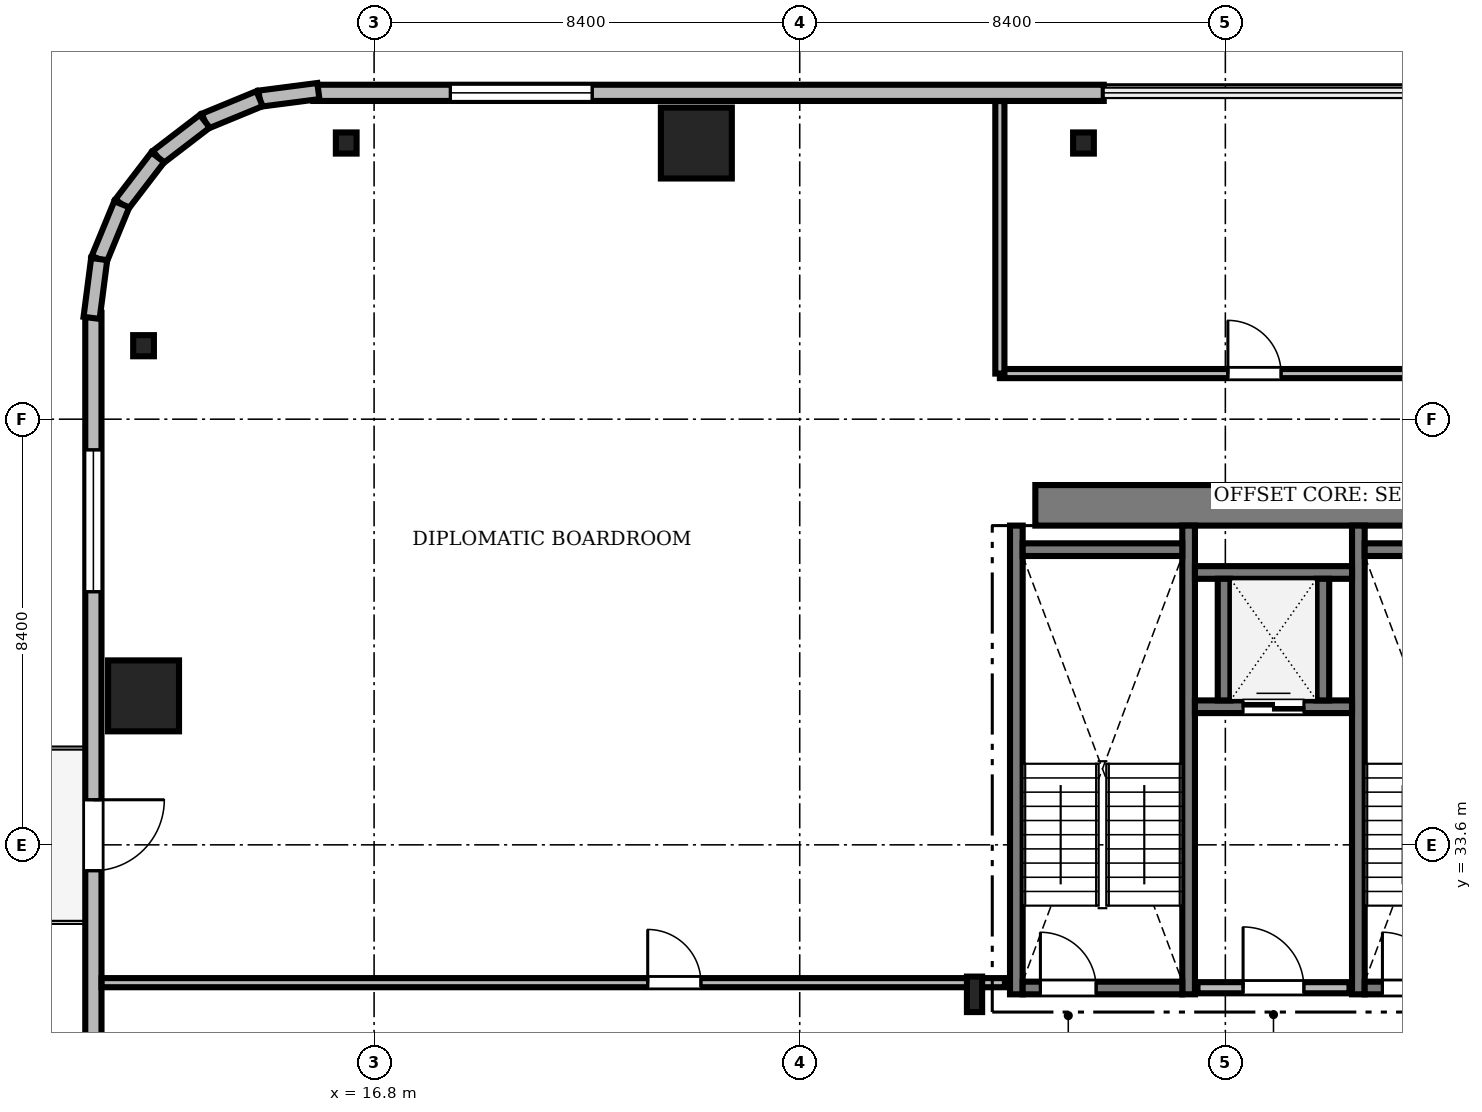
"""IFC4 building model, lengths in metres.
Left out: names, types, materials, properties, quantities, classifications, styles, units other than length and angle.
Written with IfcOpenShell. Run it as: python <this file> out.ifc"""

import sys

from ifc_helpers import new_model, si_unit, direction, frame, frame_2d, origin, origin_2d, place, context, subcontext, project, spatial, rectangle, i_section, extrude, source, transform, mapped, element, fill, save


model = new_model("IFC4")
c1 = context("Model", 3, precision=1e-05, world=origin(), true_north=direction((0.0, 1.0)))
c2 = subcontext(c1, "Body", "Model", "MODEL_VIEW")
j1 = project(units=[si_unit("LENGTHUNIT", "METRE"), si_unit("PLANEANGLEUNIT", "RADIAN")], contexts=[c1])
p1 = place(None, origin())
s1 = spatial("IfcSite", under=j1, at=p1, CompositionType="ELEMENT")
p2 = place(p1, origin())
s2 = spatial("IfcBuilding", under=s1, at=p2, CompositionType="ELEMENT")
p3 = place(p2, frame((0.0, 0.0, 233.55)))
s3 = spatial("IfcBuildingStorey", under=s2, at=p3, CompositionType="ELEMENT", Elevation=233.55)
m1 = source(origin(), c2, "Body", "SweptSolid", [
    extrude(rectangle(XDim=17.52, YDim=0.8, at=frame_2d((8.76, 0.0))), origin(), (0.0, 0.0, 1.0), 3.1),
])
p4 = place(p3, frame((29.85, 40.3, 0.0), z_axis=(0.0, 0.0, 1.0), x_axis=(1.0, 0.0, 0.0)))
e1 = element("IfcWall", 1, at=p4, inside=s3, PredefinedType="SHEAR", context=c2, shape_type="MappedRepresentation", body=[
    mapped(m1, transform((0.0, 0.0, 0.0), scale=1.0)),
])
m2 = source(origin(), c2, "Body", "SweptSolid", [
    extrude(i_section(OverallWidth=0.3, OverallDepth=0.7, WebThickness=0.017, FlangeThickness=0.032, FilletRadius=0.027, at=origin_2d()), origin(), (0.0, 0.0, 1.0), 3.1),
])
p5 = place(p3, frame((28.65, 30.65, 0.0), z_axis=(0.0, 0.0, 1.0), x_axis=(1.0, 0.0, 0.0)))
e2 = element("IfcColumn", 2, at=p5, inside=s3, PredefinedType="COLUMN", context=c2, shape_type="MappedRepresentation", body=[
    mapped(m2, transform((0.0, 0.0, 0.0), scale=1.0)),
])
m3 = source(origin(), c2, "Body", "SweptSolid", [
    extrude(rectangle(XDim=1.4, YDim=1.4, at=origin_2d()), origin(), (0.0, 0.0, 1.0), 3.1),
])
for number, where, z_axis, x_axis in (
    (3, (23.16, 47.45, 0.0), (0.0, 0.0, 1.0), (1.0, 0.0, 0.0)),
    (4, (12.25, 36.54, 0.0), (0.0, 0.0, 1.0), (1.0, 0.0, 0.0)),
):
    element("IfcColumn", number, at=place(p3, frame(where, z_axis=z_axis, x_axis=x_axis)), inside=s3, PredefinedType="COLUMN", context=c2, shape_type="MappedRepresentation", body=[
        mapped(m3, transform((0.0, 0.0, 0.0), scale=1.0)),
    ])
m4 = source(origin(), c2, "Body", "SweptSolid", [
    extrude(i_section(OverallWidth=0.409, OverallDepth=0.417, WebThickness=0.021, FlangeThickness=0.033, FilletRadius=0.015, at=origin_2d()), origin(), (0.0, 0.0, 1.0), 3.1),
])
for number, where, z_axis, x_axis in (
    (5, (30.8, 47.45, 0.0), (0.0, 0.0, 1.0), (1.0, 0.0, 0.0)),
    (6, (16.25, 47.45, 0.0), (0.0, 0.0, 1.0), (1.0, 0.0, 0.0)),
    (7, (12.25, 43.45, 0.0), (0.0, 0.0, 1.0), (1.0, 0.0, 0.0)),
):
    element("IfcColumn", number, at=place(p3, frame(where, z_axis=z_axis, x_axis=x_axis)), inside=s3, PredefinedType="COLUMN", context=c2, shape_type="MappedRepresentation", body=[
        mapped(m4, transform((0.0, 0.0, 0.0), scale=1.0)),
    ])
m5 = source(origin(), c2, "Body", "SweptSolid", [
    extrude(rectangle(XDim=15.6, YDim=0.32, at=frame_2d((7.8, 0.0))), origin(), (0.0, 0.0, 1.0), 3.1),
])
p6 = place(p3, frame((31.2, 48.44, 0.0), z_axis=(0.0, 0.0, 1.0), x_axis=(-1.0, 0.0, 0.0)))
e8 = element("IfcWall", 8, at=p6, inside=s3, PredefinedType="SOLIDWALL", context=c2, shape_type="MappedRepresentation", body=[
    mapped(m5, transform((0.0, 0.0, 0.0), scale=1.0)),
])
m6 = source(origin(), c2, "Body", "SweptSolid", [
    extrude(rectangle(XDim=2.8, YDim=2.4, at=frame_2d((1.4, 1.2))), frame((0.0, 0.17, 0.0), z_axis=(0.0, -1.0, 0.0), x_axis=(1.0, 0.0, 0.0)), (0.0, 0.0, 1.0), 0.34),
])
p7 = place(p6, frame((10.095, 0.0, 0.44)))
e9 = element("IfcOpeningElement", 9, at=p7, cuts=e8, PredefinedType="OPENING", context=c2, shape_type="MappedRepresentation", body=[
    mapped(m6, transform((0.0, 0.0, 0.0), scale=1.0)),
])
m7 = source(origin(), c2, "Body", "SweptSolid", [
    extrude(rectangle(XDim=15.6, YDim=0.32, at=frame_2d((7.8, 0.0))), origin(), (0.0, 0.0, 1.0), 3.1),
])
p8 = place(p3, frame((11.26, 44.1, 0.0), z_axis=(0.0, 0.0, 1.0), x_axis=(0.0, -1.0, 0.0)))
e10 = element("IfcWall", 10, at=p8, inside=s3, PredefinedType="SOLIDWALL", context=c2, shape_type="MappedRepresentation", body=[
    mapped(m7, transform((0.0, 0.0, 0.0), scale=1.0)),
])
m8 = source(origin(), c2, "Body", "SweptSolid", [
    extrude(rectangle(XDim=1.4, YDim=2.3, at=frame_2d((0.7, 1.15))), frame((0.0, 0.17, 0.0), z_axis=(0.0, -1.0, 0.0), x_axis=(1.0, 0.0, 0.0)), (0.0, 0.0, 1.0), 0.34),
])
p9 = place(p8, frame((9.61, 0.0, 0.0)))
e11 = element("IfcOpeningElement", 11, at=p9, cuts=e10, PredefinedType="OPENING", context=c2, shape_type="MappedRepresentation", body=[
    mapped(m8, transform((0.0, 0.0, 0.0), scale=1.0)),
])
p10 = place(p8, frame((2.705, 0.0, 0.44)))
e12 = element("IfcOpeningElement", 12, at=p10, cuts=e10, PredefinedType="OPENING", context=c2, shape_type="MappedRepresentation", body=[
    mapped(m6, transform((0.0, 0.0, 0.0), scale=1.0)),
])
m9 = source(origin(), c2, "Body", "SweptSolid", [
    extrude(rectangle(XDim=1.17, YDim=0.32, at=frame_2d((0.585, 0.0))), origin(), (0.0, 0.0, 1.0), 3.1),
])
p11 = place(p3, frame((15.7, 48.476, 0.0), z_axis=(0.0, 0.0, 1.0), x_axis=(-0.991735963317, -0.128295670475, 0.0)))
e13 = element("IfcWall", 13, at=p11, inside=s3, PredefinedType="SOLIDWALL", context=c2, shape_type="MappedRepresentation", body=[
    mapped(m9, transform((0.0, 0.0, 0.0), scale=1.0)),
])
m10 = source(origin(), c2, "Body", "SweptSolid", [
    extrude(rectangle(XDim=1.169, YDim=0.32, at=frame_2d((0.584, 0.0))), origin(), (0.0, 0.0, 1.0), 3.1),
])
p12 = place(p3, frame((14.54, 48.325, 0.0), z_axis=(0.0, 0.0, 1.0), x_axis=(-0.924552646638, -0.381054331552, 0.0)))
e14 = element("IfcWall", 14, at=p12, inside=s3, PredefinedType="SOLIDWALL", context=c2, shape_type="MappedRepresentation", body=[
    mapped(m10, transform((0.0, 0.0, 0.0), scale=1.0)),
])
m11 = source(origin(), c2, "Body", "SweptSolid", [
    extrude(rectangle(XDim=1.169, YDim=0.32, at=frame_2d((0.584, 0.0))), origin(), (0.0, 0.0, 1.0), 3.1),
])
p13 = place(p3, frame((13.459, 47.88, 0.0), z_axis=(0.0, 0.0, 1.0), x_axis=(-0.793663520347, -0.608356981114, 0.0)))
e15 = element("IfcWall", 15, at=p13, inside=s3, PredefinedType="SOLIDWALL", context=c2, shape_type="MappedRepresentation", body=[
    mapped(m11, transform((0.0, 0.0, 0.0), scale=1.0)),
])
m12 = source(origin(), c2, "Body", "SweptSolid", [
    extrude(rectangle(XDim=1.169, YDim=0.32, at=frame_2d((0.584, 0.0))), origin(), (0.0, 0.0, 1.0), 3.1),
])
p14 = place(p3, frame((12.531, 47.169, 0.0), z_axis=(0.0, 0.0, 1.0), x_axis=(-0.608387696831, -0.793639975269, 0.0)))
e16 = element("IfcWall", 16, at=p14, inside=s3, PredefinedType="SOLIDWALL", context=c2, shape_type="MappedRepresentation", body=[
    mapped(m12, transform((0.0, 0.0, 0.0), scale=1.0)),
])
p15 = place(p3, frame((11.82, 46.241, 0.0), z_axis=(0.0, 0.0, 1.0), x_axis=(-0.381054331552, -0.924552646638, 0.0)))
e17 = element("IfcWall", 17, at=p15, inside=s3, PredefinedType="SOLIDWALL", context=c2, shape_type="MappedRepresentation", body=[
    mapped(m10, transform((0.0, 0.0, 0.0), scale=1.0)),
])
p16 = place(p3, frame((11.375, 45.16, 0.0), z_axis=(0.0, 0.0, 1.0), x_axis=(-0.128295670475, -0.991735963317, 0.0)))
e18 = element("IfcWall", 18, at=p16, inside=s3, PredefinedType="SOLIDWALL", context=c2, shape_type="MappedRepresentation", body=[
    mapped(m9, transform((0.0, 0.0, 0.0), scale=1.0)),
])
m13 = source(origin(), c2, "Body", "SweptSolid", [
    extrude(rectangle(XDim=9.25, YDim=0.25, at=frame_2d((4.625, 0.0))), origin(), (0.0, 0.0, 1.0), 3.55),
])
for number, where, z_axis, x_axis in (
    (19, (29.475, 30.65, 0.0), (0.0, 0.0, 1.0), (0.0, 1.0, 0.0)),
    (20, (32.875, 30.65, 0.0), (0.0, 0.0, 1.0), (0.0, 1.0, 0.0)),
):
    element("IfcWall", number, at=place(p3, frame(where, z_axis=z_axis, x_axis=x_axis)), inside=s3, PredefinedType="SOLIDWALL", context=c2, shape_type="MappedRepresentation", body=[
        mapped(m13, transform((0.0, 0.0, 0.0), scale=1.0)),
    ])
m14 = source(origin(), c2, "Body", "SweptSolid", [
    extrude(rectangle(XDim=3.15, YDim=0.25, at=frame_2d((1.575, 0.0))), origin(), (0.0, 0.0, 1.0), 3.55),
])
p17 = place(p3, frame((29.6, 39.425, 0.0), z_axis=(0.0, 0.0, 1.0), x_axis=(1.0, 0.0, 0.0)))
e21 = element("IfcWall", 21, at=p17, inside=s3, PredefinedType="SOLIDWALL", context=c2, shape_type="MappedRepresentation", body=[
    mapped(m14, transform((0.0, 0.0, 0.0), scale=1.0)),
])
p18 = place(p3, frame((29.6, 30.775, 0.0), z_axis=(0.0, 0.0, 1.0), x_axis=(1.0, 0.0, 0.0)))
e22 = element("IfcWall", 22, at=p18, inside=s3, PredefinedType="SOLIDWALL", context=c2, shape_type="MappedRepresentation", body=[
    mapped(m14, transform((0.0, 0.0, 0.0), scale=1.0)),
])
m15 = source(origin(), c2, "Body", "SweptSolid", [
    extrude(rectangle(XDim=1.1, YDim=2.2, at=frame_2d((0.55, 1.1))), frame((0.0, 0.135, 0.0), z_axis=(0.0, -1.0, 0.0), x_axis=(1.0, 0.0, 0.0)), (0.0, 0.0, 1.0), 0.27),
])
p19 = place(p18, frame((0.35, 0.0, 0.0)))
e23 = element("IfcOpeningElement", 23, at=p19, cuts=e22, PredefinedType="OPENING", context=c2, shape_type="MappedRepresentation", body=[
    mapped(m15, transform((0.0, 0.0, 0.0), scale=1.0)),
])
p20 = place(p3, frame((36.225, 30.65, 0.0), z_axis=(0.0, 0.0, 1.0), x_axis=(0.0, 1.0, 0.0)))
e24 = element("IfcWall", 24, at=p20, inside=s3, PredefinedType="SOLIDWALL", context=c2, shape_type="MappedRepresentation", body=[
    mapped(m13, transform((0.0, 0.0, 0.0), scale=1.0)),
])
p21 = place(p3, frame((36.35, 39.425, 0.0), z_axis=(0.0, 0.0, 1.0), x_axis=(1.0, 0.0, 0.0)))
e25 = element("IfcWall", 25, at=p21, inside=s3, PredefinedType="SOLIDWALL", context=c2, shape_type="MappedRepresentation", body=[
    mapped(m14, transform((0.0, 0.0, 0.0), scale=1.0)),
])
p22 = place(p3, frame((36.35, 30.775, 0.0), z_axis=(0.0, 0.0, 1.0), x_axis=(1.0, 0.0, 0.0)))
e26 = element("IfcWall", 26, at=p22, inside=s3, PredefinedType="SOLIDWALL", context=c2, shape_type="MappedRepresentation", body=[
    mapped(m14, transform((0.0, 0.0, 0.0), scale=1.0)),
])
p23 = place(p22, frame((0.35, 0.0, 0.0)))
e27 = element("IfcOpeningElement", 27, at=p23, cuts=e26, PredefinedType="OPENING", context=c2, shape_type="MappedRepresentation", body=[
    mapped(m15, transform((0.0, 0.0, 0.0), scale=1.0)),
])
m16 = source(origin(), c2, "Body", "SweptSolid", [
    extrude(rectangle(XDim=3.0, YDim=0.22, at=frame_2d((1.5, 0.0))), origin(), (0.0, 0.0, 1.0), 3.1),
])
p24 = place(p3, frame((33.05, 30.78, 0.0), z_axis=(0.0, 0.0, 1.0), x_axis=(1.0, 0.0, 0.0)))
e28 = element("IfcWall", 28, at=p24, inside=s3, PredefinedType="SOLIDWALL", context=c2, shape_type="MappedRepresentation", body=[
    mapped(m16, transform((0.0, 0.0, 0.0), scale=1.0)),
])
m17 = source(origin(), c2, "Body", "SweptSolid", [
    extrude(rectangle(XDim=1.2, YDim=2.2, at=frame_2d((0.6, 1.1))), frame((0.0, 0.12, 0.0), z_axis=(0.0, -1.0, 0.0), x_axis=(1.0, 0.0, 0.0)), (0.0, 0.0, 1.0), 0.24),
])
p25 = place(p24, frame((0.9, 0.0, 0.0)))
e29 = element("IfcOpeningElement", 29, at=p25, cuts=e28, PredefinedType="OPENING", context=c2, shape_type="MappedRepresentation", body=[
    mapped(m17, transform((0.0, 0.0, 0.0), scale=1.0)),
])
m18 = source(origin(), c2, "Body", "SweptSolid", [
    extrude(rectangle(XDim=3.1, YDim=0.25, at=frame_2d((1.55, 0.0))), origin(), (0.0, 0.0, 1.0), 3.1),
])
p26 = place(p3, frame((33.0, 36.325, 0.0), z_axis=(0.0, 0.0, 1.0), x_axis=(1.0, 0.0, 0.0)))
e30 = element("IfcWall", 30, at=p26, inside=s3, PredefinedType="SOLIDWALL", context=c2, shape_type="MappedRepresentation", body=[
    mapped(m18, transform((0.0, 0.0, 0.0), scale=1.0)),
])
m19 = source(origin(), c2, "Body", "SweptSolid", [
    extrude(rectangle(XDim=1.2, YDim=2.25, at=frame_2d((0.6, 1.125))), frame((0.0, 0.135, 0.0), z_axis=(0.0, -1.0, 0.0), x_axis=(1.0, 0.0, 0.0)), (0.0, 0.0, 1.0), 0.27),
])
p27 = place(p26, frame((0.95, 0.0, 0.0)))
e31 = element("IfcOpeningElement", 31, at=p27, cuts=e30, PredefinedType="OPENING", context=c2, shape_type="MappedRepresentation", body=[
    mapped(m19, transform((0.0, 0.0, 0.0), scale=1.0)),
])
p28 = place(p3, frame((33.0, 38.975, 0.0), z_axis=(0.0, 0.0, 1.0), x_axis=(1.0, 0.0, 0.0)))
e32 = element("IfcWall", 32, at=p28, inside=s3, PredefinedType="SOLIDWALL", context=c2, shape_type="MappedRepresentation", body=[
    mapped(m18, transform((0.0, 0.0, 0.0), scale=1.0)),
])
m20 = source(origin(), c2, "Body", "SweptSolid", [
    extrude(rectangle(XDim=2.4, YDim=0.25, at=frame_2d((1.2, 0.0))), origin(), (0.0, 0.0, 1.0), 3.1),
])
for number, where, z_axis, x_axis in (
    (33, (33.575, 36.45, 0.0), (0.0, 0.0, 1.0), (0.0, 1.0, 0.0)),
    (34, (35.525, 36.45, 0.0), (0.0, 0.0, 1.0), (0.0, 1.0, 0.0)),
):
    element("IfcWall", number, at=place(p3, frame(where, z_axis=z_axis, x_axis=x_axis)), inside=s3, PredefinedType="SOLIDWALL", context=c2, shape_type="MappedRepresentation", body=[
        mapped(m20, transform((0.0, 0.0, 0.0), scale=1.0)),
    ])
m21 = source(origin(), c2, "Body", "SweptSolid", [
    extrude(rectangle(XDim=28.428, YDim=0.18, at=frame_2d((14.214, 0.0))), origin(), (0.0, 0.0, 1.0), 2.376),
])
p29 = place(p3, frame((29.15, 42.9, 0.0), z_axis=(0.0, 0.0, 1.0), x_axis=(1.0, 0.0, 0.0)))
e35 = element("IfcWall", 35, at=p29, inside=s3, PredefinedType="PARTITIONING", context=c2, shape_type="MappedRepresentation", body=[
    mapped(m21, transform((0.0, 0.0, 0.0), scale=1.0)),
])
m22 = source(origin(), c2, "Body", "SweptSolid", [
    extrude(rectangle(XDim=1.05, YDim=2.2, at=frame_2d((0.525, 1.1))), frame((0.0, 0.1, 0.0), z_axis=(0.0, -1.0, 0.0), x_axis=(1.0, 0.0, 0.0)), (0.0, 0.0, 1.0), 0.2),
])
p30 = place(p29, frame((4.5, 0.0, 0.0)))
e36 = element("IfcOpeningElement", 36, at=p30, cuts=e35, PredefinedType="OPENING", context=c2, shape_type="MappedRepresentation", body=[
    mapped(m22, transform((0.0, 0.0, 0.0), scale=1.0)),
])
m23 = source(origin(), c2, "Body", "SweptSolid", [
    extrude(rectangle(XDim=17.828, YDim=0.18, at=frame_2d((8.914, 0.0))), origin(), (0.0, 0.0, 1.0), 2.376),
])
p31 = place(p3, frame((11.422, 30.88, 0.0), z_axis=(0.0, 0.0, 1.0), x_axis=(1.0, 0.0, 0.0)))
e37 = element("IfcWall", 37, at=p31, inside=s3, PredefinedType="PARTITIONING", context=c2, shape_type="MappedRepresentation", body=[
    mapped(m23, transform((0.0, 0.0, 0.0), scale=1.0)),
])
p32 = place(p31, frame((10.778, 0.0, 0.0)))
e38 = element("IfcOpeningElement", 38, at=p32, cuts=e37, PredefinedType="OPENING", context=c2, shape_type="MappedRepresentation", body=[
    mapped(m22, transform((0.0, 0.0, 0.0), scale=1.0)),
])
m24 = source(origin(), c2, "Body", "SweptSolid", [
    extrude(rectangle(XDim=5.378, YDim=0.18, at=frame_2d((2.689, 0.0))), origin(), (0.0, 0.0, 1.0), 2.376),
])
p33 = place(p3, frame((29.15, 42.9, 0.0), z_axis=(0.0, 0.0, 1.0), x_axis=(0.0, 1.0, 0.0)))
e39 = element("IfcWall", 39, at=p33, inside=s3, PredefinedType="PARTITIONING", context=c2, shape_type="MappedRepresentation", body=[
    mapped(m24, transform((0.0, 0.0, 0.0), scale=1.0)),
])
m25 = source(origin(), c2, "Body", "SweptSolid", [
    extrude(rectangle(XDim=2.8, YDim=2.4, at=frame_2d((1.4, 1.2))), frame((0.0, 0.03, 0.0), z_axis=(0.0, -1.0, 0.0), x_axis=(1.0, 0.0, 0.0)), (0.0, 0.0, 1.0), 0.06),
])
p34 = place(p7, origin())
e40 = element("IfcWindow", 40, at=p34, inside=s3, PartitioningType="SINGLE_PANEL", PredefinedType="WINDOW", context=c2, shape_type="MappedRepresentation", body=[
    mapped(m25, transform((0.0, 0.0, 0.0), scale=1.0)),
])
fill(e9, e40)
m26 = source(origin(), c2, "Body", "SweptSolid", [
    extrude(rectangle(XDim=1.4, YDim=2.3, at=frame_2d((0.7, 1.15))), frame((0.0, 0.025, 0.0), z_axis=(0.0, -1.0, 0.0), x_axis=(1.0, 0.0, 0.0)), (0.0, 0.0, 1.0), 0.05),
])
p35 = place(p9, frame((1.4, 0.0, 0.0), z_axis=(0.0, 0.0, 1.0), x_axis=(-1.0, 0.0, 0.0)))
e41 = element("IfcDoor", 41, at=p35, inside=s3, OperationType="DOUBLE_DOOR_SLIDING", PredefinedType="DOOR", context=c2, shape_type="MappedRepresentation", body=[
    mapped(m26, transform((0.0, 0.0, 0.0), scale=1.0)),
])
fill(e11, e41)
p36 = place(p10, origin())
e42 = element("IfcWindow", 42, at=p36, inside=s3, PartitioningType="SINGLE_PANEL", PredefinedType="WINDOW", context=c2, shape_type="MappedRepresentation", body=[
    mapped(m25, transform((0.0, 0.0, 0.0), scale=1.0)),
])
fill(e12, e42)
m27 = source(origin(), c2, "Body", "SweptSolid", [
    extrude(rectangle(XDim=1.1, YDim=2.2, at=frame_2d((0.55, 1.1))), frame((0.0, 0.025, 0.0), z_axis=(0.0, -1.0, 0.0), x_axis=(1.0, 0.0, 0.0)), (0.0, 0.0, 1.0), 0.05),
])
p37 = place(p19, origin())
e43 = element("IfcDoor", 43, at=p37, inside=s3, OperationType="SINGLE_SWING_LEFT", PredefinedType="DOOR", context=c2, shape_type="MappedRepresentation", body=[
    mapped(m27, transform((0.0, 0.0, 0.0), scale=1.0)),
])
fill(e23, e43)
p38 = place(p23, origin())
e44 = element("IfcDoor", 44, at=p38, inside=s3, OperationType="SINGLE_SWING_LEFT", PredefinedType="DOOR", context=c2, shape_type="MappedRepresentation", body=[
    mapped(m27, transform((0.0, 0.0, 0.0), scale=1.0)),
])
fill(e27, e44)
m28 = source(origin(), c2, "Body", "SweptSolid", [
    extrude(rectangle(XDim=1.2, YDim=2.2, at=frame_2d((0.6, 1.1))), frame((0.0, 0.025, 0.0), z_axis=(0.0, -1.0, 0.0), x_axis=(1.0, 0.0, 0.0)), (0.0, 0.0, 1.0), 0.05),
])
p39 = place(p25, origin())
e45 = element("IfcDoor", 45, at=p39, inside=s3, OperationType="SINGLE_SWING_LEFT", PredefinedType="DOOR", context=c2, shape_type="MappedRepresentation", body=[
    mapped(m28, transform((0.0, 0.0, 0.0), scale=1.0)),
])
fill(e29, e45)
m29 = source(origin(), c2, "Body", "SweptSolid", [
    extrude(rectangle(XDim=1.2, YDim=2.25, at=frame_2d((0.6, 1.125))), frame((0.0, 0.025, 0.0), z_axis=(0.0, -1.0, 0.0), x_axis=(1.0, 0.0, 0.0)), (0.0, 0.0, 1.0), 0.05),
])
p40 = place(p27, origin())
e46 = element("IfcDoor", 46, at=p40, inside=s3, OperationType="DOUBLE_DOOR_SLIDING", PredefinedType="DOOR", context=c2, shape_type="MappedRepresentation", body=[
    mapped(m29, transform((0.0, 0.0, 0.0), scale=1.0)),
])
fill(e31, e46)
m30 = source(origin(), c2, "Body", "SweptSolid", [
    extrude(rectangle(XDim=1.05, YDim=2.2, at=frame_2d((0.525, 1.1))), frame((0.0, 0.025, 0.0), z_axis=(0.0, -1.0, 0.0), x_axis=(1.0, 0.0, 0.0)), (0.0, 0.0, 1.0), 0.05),
])
p41 = place(p30, origin())
e47 = element("IfcDoor", 47, at=p41, inside=s3, OperationType="SINGLE_SWING_LEFT", PredefinedType="DOOR", context=c2, shape_type="MappedRepresentation", body=[
    mapped(m30, transform((0.0, 0.0, 0.0), scale=1.0)),
])
fill(e36, e47)
p42 = place(p32, origin())
e48 = element("IfcDoor", 48, at=p42, inside=s3, OperationType="SINGLE_SWING_LEFT", PredefinedType="DOOR", context=c2, shape_type="MappedRepresentation", body=[
    mapped(m30, transform((0.0, 0.0, 0.0), scale=1.0)),
])
fill(e38, e48)
save(model, sys.argv[1])
